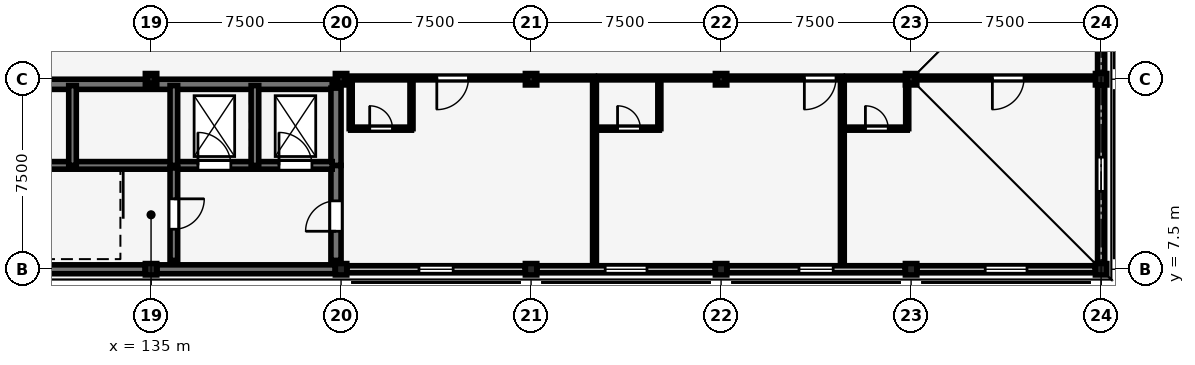
"""IFC4 building model, lengths in metres.
Left out: names, types, materials, properties, quantities, classifications, styles, units other than length and angle.
Written with IfcOpenShell. Run it as: python <this file> out.ifc"""

import sys

from ifc_helpers import new_model, si_unit, direction, frame, frame_2d, origin, origin_2d, place, context, subcontext, project, spatial, rectangle, i_section, extrude, element, fill, save


model = new_model("IFC4")
c1 = context("Model", 3, precision=1e-05, world=origin(), true_north=direction((0.0, 1.0)))
c2 = subcontext(c1, "Body", "Model", "MODEL_VIEW")
j1 = project(units=[si_unit("LENGTHUNIT", "METRE"), si_unit("PLANEANGLEUNIT", "RADIAN")], contexts=[c1])
p1 = place(None, origin())
s1 = spatial("IfcSite", under=j1, at=p1, CompositionType="ELEMENT")
p2 = place(p1, origin())
s2 = spatial("IfcBuilding", under=s1, at=p2, CompositionType="ELEMENT")
p3 = place(p2, frame((0.0, 0.0, 21.9)))
s3 = spatial("IfcBuildingStorey", under=s2, at=p3, CompositionType="ELEMENT", Elevation=21.9)
for number, where, z_axis, x_axis in (
    (1, (135.0, 7.5, 0.0), (0.0, 0.0, 1.0), (1.0, 0.0, 0.0)),
    (2, (135.0, 15.0, 0.0), (0.0, 0.0, 1.0), (1.0, 0.0, 0.0)),
    (3, (142.5, 7.5, 0.0), (0.0, 0.0, 1.0), (1.0, 0.0, 0.0)),
    (4, (142.5, 15.0, 0.0), (0.0, 0.0, 1.0), (1.0, 0.0, 0.0)),
    (5, (150.0, 7.5, 0.0), (0.0, 0.0, 1.0), (1.0, 0.0, 0.0)),
    (6, (150.0, 15.0, 0.0), (0.0, 0.0, 1.0), (1.0, 0.0, 0.0)),
    (7, (157.5, 7.5, 0.0), (0.0, 0.0, 1.0), (1.0, 0.0, 0.0)),
    (8, (157.5, 15.0, 0.0), (0.0, 0.0, 1.0), (1.0, 0.0, 0.0)),
    (9, (165.0, 7.5, 0.0), (0.0, 0.0, 1.0), (1.0, 0.0, 0.0)),
    (10, (165.0, 15.0, 0.0), (0.0, 0.0, 1.0), (1.0, 0.0, 0.0)),
    (11, (172.5, 7.5, 0.0), (0.0, 0.0, 1.0), (1.0, 0.0, 0.0)),
    (12, (172.5, 15.0, 0.0), (0.0, 0.0, 1.0), (1.0, 0.0, 0.0)),
):
    element("IfcColumn", number, at=place(p3, frame(where, z_axis=z_axis, x_axis=x_axis)), inside=s3, PredefinedType="COLUMN", context=c2, shape_type="SweptSolid", body=[
        extrude(rectangle(XDim=0.45, YDim=0.45, at=origin_2d()), origin(), (0.0, 0.0, 1.0), 4.05),
    ])
for number, where, z_axis, x_axis in (
    (13, (135.0, 15.0, 4.05), (0.0, 0.0, 1.0), (1.0, 0.0, 0.0)),
    (14, (142.5, 15.0, 4.05), (0.0, 0.0, 1.0), (1.0, 0.0, 0.0)),
    (15, (150.0, 15.0, 4.05), (0.0, 0.0, 1.0), (1.0, 0.0, 0.0)),
    (16, (157.5, 15.0, 4.05), (0.0, 0.0, 1.0), (1.0, 0.0, 0.0)),
    (17, (165.0, 15.0, 4.05), (0.0, 0.0, 1.0), (1.0, 0.0, 0.0)),
):
    element("IfcColumn", number, at=place(p3, frame(where, z_axis=z_axis, x_axis=x_axis)), inside=s3, PredefinedType="COLUMN", context=c2, shape_type="SweptSolid", body=[
        extrude(i_section(OverallWidth=0.3, OverallDepth=0.3, WebThickness=0.011, FlangeThickness=0.019, FilletRadius=0.027, at=origin_2d()), origin(), (0.0, 0.0, 1.0), 1.97),
    ])
for number, where, z_axis, x_axis in (
    (18, (134.765, 7.5, 0.0), (0.0, 0.0, 1.0), (-1.0, 0.0, 0.0)),
    (19, (142.265, 7.5, 0.0), (0.0, 0.0, 1.0), (-1.0, 0.0, 0.0)),
):
    element("IfcWall", number, at=place(p3, frame(where, z_axis=z_axis, x_axis=x_axis)), inside=s3, PredefinedType="SHEAR", context=c2, shape_type="SweptSolid", body=[
        extrude(rectangle(XDim=7.03, YDim=0.35, at=frame_2d((3.515, 0.0))), origin(), (0.0, 0.0, 1.0), 3.77),
    ])
p4 = place(p3, frame((149.765, 7.5, 0.0), z_axis=(0.0, 0.0, 1.0), x_axis=(-1.0, 0.0, 0.0)))
e20 = element("IfcWall", 20, at=p4, inside=s3, PredefinedType="STANDARD", context=c2, shape_type="SweptSolid", body=[
    extrude(rectangle(XDim=7.03, YDim=0.28, at=frame_2d((3.515, 0.0))), origin(), (0.0, 0.0, 1.0), 3.77),
])
p5 = place(p4, frame((2.84, 0.0, 0.85)))
e21 = element("IfcOpeningElement", 21, at=p5, cuts=e20, PredefinedType="OPENING", context=c2, shape_type="SweptSolid", body=[
    extrude(rectangle(XDim=1.35, YDim=2.25, at=frame_2d((0.675, 1.125))), frame((0.0, 0.15, 0.0), z_axis=(0.0, -1.0, 0.0), x_axis=(1.0, 0.0, 0.0)), (0.0, 0.0, 1.0), 0.3),
])
p6 = place(p3, frame((157.265, 7.5, 0.0), z_axis=(0.0, 0.0, 1.0), x_axis=(-1.0, 0.0, 0.0)))
e22 = element("IfcWall", 22, at=p6, inside=s3, PredefinedType="STANDARD", context=c2, shape_type="SweptSolid", body=[
    extrude(rectangle(XDim=7.03, YDim=0.28, at=frame_2d((3.515, 0.0))), origin(), (0.0, 0.0, 1.0), 3.77),
])
p7 = place(p6, frame((2.69, 0.0, 0.85)))
e23 = element("IfcOpeningElement", 23, at=p7, cuts=e22, PredefinedType="OPENING", context=c2, shape_type="SweptSolid", body=[
    extrude(rectangle(XDim=1.65, YDim=2.25, at=frame_2d((0.825, 1.125))), frame((0.0, 0.15, 0.0), z_axis=(0.0, -1.0, 0.0), x_axis=(1.0, 0.0, 0.0)), (0.0, 0.0, 1.0), 0.3),
])
p8 = place(p3, frame((164.765, 7.5, 0.0), z_axis=(0.0, 0.0, 1.0), x_axis=(-1.0, 0.0, 0.0)))
e24 = element("IfcWall", 24, at=p8, inside=s3, PredefinedType="STANDARD", context=c2, shape_type="SweptSolid", body=[
    extrude(rectangle(XDim=7.03, YDim=0.28, at=frame_2d((3.515, 0.0))), origin(), (0.0, 0.0, 1.0), 3.77),
])
p9 = place(p8, frame((2.84, 0.0, 0.85)))
e25 = element("IfcOpeningElement", 25, at=p9, cuts=e24, PredefinedType="OPENING", context=c2, shape_type="SweptSolid", body=[
    extrude(rectangle(XDim=1.35, YDim=2.25, at=frame_2d((0.675, 1.125))), frame((0.0, 0.15, 0.0), z_axis=(0.0, -1.0, 0.0), x_axis=(1.0, 0.0, 0.0)), (0.0, 0.0, 1.0), 0.3),
])
p10 = place(p3, frame((172.265, 7.5, 0.0), z_axis=(0.0, 0.0, 1.0), x_axis=(-1.0, 0.0, 0.0)))
e26 = element("IfcWall", 26, at=p10, inside=s3, PredefinedType="STANDARD", context=c2, shape_type="SweptSolid", body=[
    extrude(rectangle(XDim=7.03, YDim=0.28, at=frame_2d((3.515, 0.0))), origin(), (0.0, 0.0, 1.0), 3.77),
])
p11 = place(p10, frame((2.69, 0.0, 0.85)))
e27 = element("IfcOpeningElement", 27, at=p11, cuts=e26, PredefinedType="OPENING", context=c2, shape_type="SweptSolid", body=[
    extrude(rectangle(XDim=1.65, YDim=2.25, at=frame_2d((0.825, 1.125))), frame((0.0, 0.15, 0.0), z_axis=(0.0, -1.0, 0.0), x_axis=(1.0, 0.0, 0.0)), (0.0, 0.0, 1.0), 0.3),
])
p12 = place(p3, frame((172.5, 14.765, 0.0), z_axis=(0.0, 0.0, 1.0), x_axis=(0.0, -1.0, 0.0)))
e28 = element("IfcWall", 28, at=p12, inside=s3, PredefinedType="STANDARD", context=c2, shape_type="SweptSolid", body=[
    extrude(rectangle(XDim=7.03, YDim=0.28, at=frame_2d((3.515, 0.0))), origin(), (0.0, 0.0, 1.0), 3.77),
])
p13 = place(p12, frame((2.84, 0.0, 0.85)))
e29 = element("IfcOpeningElement", 29, at=p13, cuts=e28, PredefinedType="OPENING", context=c2, shape_type="SweptSolid", body=[
    extrude(rectangle(XDim=1.35, YDim=2.25, at=frame_2d((0.675, 1.125))), frame((0.0, 0.15, 0.0), z_axis=(0.0, -1.0, 0.0), x_axis=(1.0, 0.0, 0.0)), (0.0, 0.0, 1.0), 0.3),
])
p14 = place(p3, frame((172.5, 22.265, 0.0), z_axis=(0.0, 0.0, 1.0), x_axis=(0.0, -1.0, 0.0)))
e30 = element("IfcWall", 30, at=p14, inside=s3, PredefinedType="STANDARD", context=c2, shape_type="SweptSolid", body=[
    extrude(rectangle(XDim=7.03, YDim=0.28, at=frame_2d((3.515, 0.0))), origin(), (0.0, 0.0, 1.0), 3.77),
])
p15 = place(p14, frame((2.69, 0.0, 0.85)))
e31 = element("IfcOpeningElement", 31, at=p15, cuts=e30, PredefinedType="OPENING", context=c2, shape_type="SweptSolid", body=[
    extrude(rectangle(XDim=1.65, YDim=2.25, at=frame_2d((0.825, 1.125))), frame((0.0, 0.15, 0.0), z_axis=(0.0, -1.0, 0.0), x_axis=(1.0, 0.0, 0.0)), (0.0, 0.0, 1.0), 0.3),
])
p16 = place(p3, frame((127.85, 14.8, 0.0), z_axis=(0.0, 0.0, 1.0), x_axis=(1.0, 0.0, 0.0)))
e32 = element("IfcWall", 32, at=p16, inside=s3, PredefinedType="SHEAR", context=c2, shape_type="SweptSolid", body=[
    extrude(rectangle(XDim=14.3, YDim=0.4, at=frame_2d((7.15, 0.0))), origin(), (0.0, 0.0, 1.0), 3.77),
])
p17 = place(p3, frame((142.3, 7.85, 0.0), z_axis=(0.0, 0.0, 1.0), x_axis=(0.0, 1.0, 0.0)))
e33 = element("IfcWall", 33, at=p17, inside=s3, PredefinedType="SHEAR", context=c2, shape_type="SweptSolid", body=[
    extrude(rectangle(XDim=3.75, YDim=0.4, at=frame_2d((1.875, 0.0))), origin(), (0.0, 0.0, 1.0), 3.77),
])
p18 = place(p17, frame((1.15, 0.0, 0.0)))
e34 = element("IfcOpeningElement", 34, at=p18, cuts=e33, PredefinedType="OPENING", context=c2, shape_type="SweptSolid", body=[
    extrude(rectangle(XDim=1.2, YDim=2.25, at=frame_2d((0.6, 1.125))), frame((0.0, 0.21, 0.0), z_axis=(0.0, -1.0, 0.0), x_axis=(1.0, 0.0, 0.0)), (0.0, 0.0, 1.0), 0.42),
])
p19 = place(p3, frame((142.3, 11.6, 0.0), z_axis=(0.0, 0.0, 1.0), x_axis=(0.0, 1.0, 0.0)))
e35 = element("IfcWall", 35, at=p19, inside=s3, PredefinedType="SHEAR", context=c2, shape_type="SweptSolid", body=[
    extrude(rectangle(XDim=3.05, YDim=0.4, at=frame_2d((1.525, 0.0))), origin(), (0.0, 0.0, 1.0), 3.77),
])
p20 = place(p3, frame((127.85, 11.6, 0.0), z_axis=(0.0, 0.0, 1.0), x_axis=(1.0, 0.0, 0.0)))
e36 = element("IfcWall", 36, at=p20, inside=s3, PredefinedType="SHEAR", context=c2, shape_type="SweptSolid", body=[
    extrude(rectangle(XDim=8.05, YDim=0.3, at=frame_2d((4.025, 0.0))), origin(), (0.0, 0.0, 1.0), 3.77),
])
p21 = place(p3, frame((135.9, 11.6, 0.0), z_axis=(0.0, 0.0, 1.0), x_axis=(1.0, 0.0, 0.0)))
e37 = element("IfcWall", 37, at=p21, inside=s3, PredefinedType="SHEAR", context=c2, shape_type="SweptSolid", body=[
    extrude(rectangle(XDim=6.25, YDim=0.3, at=frame_2d((3.125, 0.0))), origin(), (0.0, 0.0, 1.0), 3.77),
])
p22 = place(p21, frame((0.95, 0.0, 0.0)))
e38 = element("IfcOpeningElement", 38, at=p22, cuts=e37, PredefinedType="OPENING", context=c2, shape_type="SweptSolid", body=[
    extrude(rectangle(XDim=1.3, YDim=2.2, at=frame_2d((0.65, 1.1))), frame((0.0, 0.16, 0.0), z_axis=(0.0, -1.0, 0.0), x_axis=(1.0, 0.0, 0.0)), (0.0, 0.0, 1.0), 0.32),
])
p23 = place(p21, frame((4.15, 0.0, 0.0)))
e39 = element("IfcOpeningElement", 39, at=p23, cuts=e37, PredefinedType="OPENING", context=c2, shape_type="SweptSolid", body=[
    extrude(rectangle(XDim=1.3, YDim=2.2, at=frame_2d((0.65, 1.1))), frame((0.0, 0.16, 0.0), z_axis=(0.0, -1.0, 0.0), x_axis=(1.0, 0.0, 0.0)), (0.0, 0.0, 1.0), 0.32),
])
p24 = place(p3, frame((135.9, 11.5, 0.0), z_axis=(0.0, 0.0, 1.0), x_axis=(0.0, -1.0, 0.0)))
e40 = element("IfcWall", 40, at=p24, inside=s3, PredefinedType="SHEAR", context=c2, shape_type="SweptSolid", body=[
    extrude(rectangle(XDim=3.65, YDim=0.3, at=frame_2d((1.825, 0.0))), origin(), (0.0, 0.0, 1.0), 3.77),
])
p25 = place(p24, frame((1.22, 0.0, 0.0)))
e41 = element("IfcOpeningElement", 41, at=p25, cuts=e40, PredefinedType="OPENING", context=c2, shape_type="SweptSolid", body=[
    extrude(rectangle(XDim=1.2, YDim=2.25, at=frame_2d((0.6, 1.125))), frame((0.0, 0.16, 0.0), z_axis=(0.0, -1.0, 0.0), x_axis=(1.0, 0.0, 0.0)), (0.0, 0.0, 1.0), 0.32),
])
for number, where, z_axis, x_axis in (
    (42, (131.9, 11.6, 0.0), (0.0, 0.0, 1.0), (0.0, 1.0, 0.0)),
    (43, (135.9, 11.6, 0.0), (0.0, 0.0, 1.0), (0.0, 1.0, 0.0)),
    (44, (139.1, 11.6, 0.0), (0.0, 0.0, 1.0), (0.0, 1.0, 0.0)),
):
    element("IfcWall", number, at=place(p3, frame(where, z_axis=z_axis, x_axis=x_axis)), inside=s3, PredefinedType="SHEAR", context=c2, shape_type="SweptSolid", body=[
        extrude(rectangle(XDim=3.15, YDim=0.3, at=frame_2d((1.575, 0.0))), origin(), (0.0, 0.0, 1.0), 3.77),
    ])
p26 = place(p3, frame((152.503, 15.05, 0.0), z_axis=(0.0, 0.0, 1.0), x_axis=(-1.0, 0.0, 0.0)))
e45 = element("IfcWall", 45, at=p26, inside=s3, PredefinedType="PARTITIONING", context=c2, shape_type="SweptSolid", body=[
    extrude(rectangle(XDim=9.624, YDim=0.15, at=frame_2d((4.812, 0.0))), origin(), (0.0, 0.0, 1.0), 3.755),
])
p27 = place(p26, frame((4.974, 0.0, 0.0)))
e46 = element("IfcOpeningElement", 46, at=p27, cuts=e45, PredefinedType="OPENING", context=c2, shape_type="SweptSolid", body=[
    extrude(rectangle(XDim=1.25, YDim=2.2, at=frame_2d((0.625, 1.1))), frame((0.0, 0.085, 0.0), z_axis=(0.0, -1.0, 0.0), x_axis=(1.0, 0.0, 0.0)), (0.0, 0.0, 1.0), 0.17),
])
p28 = place(p3, frame((142.88, 13.05, 0.0), z_axis=(0.0, 0.0, 1.0), x_axis=(1.0, 0.0, 0.0)))
e47 = element("IfcWall", 47, at=p28, inside=s3, PredefinedType="PARTITIONING", context=c2, shape_type="SweptSolid", body=[
    extrude(rectangle(XDim=2.4, YDim=0.12, at=frame_2d((1.2, 0.0))), origin(), (0.0, 0.0, 1.0), 3.755),
])
p29 = place(p28, frame((0.75, 0.0, 0.0)))
e48 = element("IfcOpeningElement", 48, at=p29, cuts=e47, PredefinedType="OPENING", context=c2, shape_type="SweptSolid", body=[
    extrude(rectangle(XDim=0.9, YDim=2.1, at=frame_2d((0.45, 1.05))), frame((0.0, 0.07, 0.0), z_axis=(0.0, -1.0, 0.0), x_axis=(1.0, 0.0, 0.0)), (0.0, 0.0, 1.0), 0.14),
])
p30 = place(p3, frame((145.28, 13.05, 0.0), z_axis=(0.0, 0.0, 1.0), x_axis=(0.0, 1.0, 0.0)))
e49 = element("IfcWall", 49, at=p30, inside=s3, PredefinedType="PARTITIONING", context=c2, shape_type="SweptSolid", body=[
    extrude(rectangle(XDim=2.0, YDim=0.12, at=frame_2d((1.0, 0.0))), origin(), (0.0, 0.0, 1.0), 3.755),
])
p31 = place(p3, frame((162.287, 15.05, 0.0), z_axis=(0.0, 0.0, 1.0), x_axis=(-1.0, 0.0, 0.0)))
e50 = element("IfcWall", 50, at=p31, inside=s3, PredefinedType="PARTITIONING", context=c2, shape_type="SweptSolid", body=[
    extrude(rectangle(XDim=9.623, YDim=0.15, at=frame_2d((4.812, 0.0))), origin(), (0.0, 0.0, 1.0), 3.755),
])
p32 = place(p31, frame((0.25, 0.0, 0.0)))
e51 = element("IfcOpeningElement", 51, at=p32, cuts=e50, PredefinedType="OPENING", context=c2, shape_type="SweptSolid", body=[
    extrude(rectangle(XDim=1.25, YDim=2.2, at=frame_2d((0.625, 1.1))), frame((0.0, 0.085, 0.0), z_axis=(0.0, -1.0, 0.0), x_axis=(1.0, 0.0, 0.0)), (0.0, 0.0, 1.0), 0.17),
])
p33 = place(p3, frame((152.663, 13.05, 0.0), z_axis=(0.0, 0.0, 1.0), x_axis=(1.0, 0.0, 0.0)))
e52 = element("IfcWall", 52, at=p33, inside=s3, PredefinedType="PARTITIONING", context=c2, shape_type="SweptSolid", body=[
    extrude(rectangle(XDim=2.4, YDim=0.12, at=frame_2d((1.2, 0.0))), origin(), (0.0, 0.0, 1.0), 3.755),
])
p34 = place(p33, frame((0.75, 0.0, 0.0)))
e53 = element("IfcOpeningElement", 53, at=p34, cuts=e52, PredefinedType="OPENING", context=c2, shape_type="SweptSolid", body=[
    extrude(rectangle(XDim=0.9, YDim=2.1, at=frame_2d((0.45, 1.05))), frame((0.0, 0.07, 0.0), z_axis=(0.0, -1.0, 0.0), x_axis=(1.0, 0.0, 0.0)), (0.0, 0.0, 1.0), 0.14),
])
p35 = place(p3, frame((155.063, 13.05, 0.0), z_axis=(0.0, 0.0, 1.0), x_axis=(0.0, 1.0, 0.0)))
e54 = element("IfcWall", 54, at=p35, inside=s3, PredefinedType="PARTITIONING", context=c2, shape_type="SweptSolid", body=[
    extrude(rectangle(XDim=2.0, YDim=0.12, at=frame_2d((1.0, 0.0))), origin(), (0.0, 0.0, 1.0), 3.755),
])
p36 = place(p3, frame((172.07, 15.05, 0.0), z_axis=(0.0, 0.0, 1.0), x_axis=(-1.0, 0.0, 0.0)))
e55 = element("IfcWall", 55, at=p36, inside=s3, PredefinedType="PARTITIONING", context=c2, shape_type="SweptSolid", body=[
    extrude(rectangle(XDim=9.623, YDim=0.15, at=frame_2d((4.812, 0.0))), origin(), (0.0, 0.0, 1.0), 3.755),
])
p37 = place(p36, frame((2.612, 0.0, 0.0)))
e56 = element("IfcOpeningElement", 56, at=p37, cuts=e55, PredefinedType="OPENING", context=c2, shape_type="SweptSolid", body=[
    extrude(rectangle(XDim=1.25, YDim=2.2, at=frame_2d((0.625, 1.1))), frame((0.0, 0.085, 0.0), z_axis=(0.0, -1.0, 0.0), x_axis=(1.0, 0.0, 0.0)), (0.0, 0.0, 1.0), 0.17),
])
p38 = place(p3, frame((162.447, 13.05, 0.0), z_axis=(0.0, 0.0, 1.0), x_axis=(1.0, 0.0, 0.0)))
e57 = element("IfcWall", 57, at=p38, inside=s3, PredefinedType="PARTITIONING", context=c2, shape_type="SweptSolid", body=[
    extrude(rectangle(XDim=2.4, YDim=0.12, at=frame_2d((1.2, 0.0))), origin(), (0.0, 0.0, 1.0), 3.755),
])
p39 = place(p38, frame((0.75, 0.0, 0.0)))
e58 = element("IfcOpeningElement", 58, at=p39, cuts=e57, PredefinedType="OPENING", context=c2, shape_type="SweptSolid", body=[
    extrude(rectangle(XDim=0.9, YDim=2.1, at=frame_2d((0.45, 1.05))), frame((0.0, 0.07, 0.0), z_axis=(0.0, -1.0, 0.0), x_axis=(1.0, 0.0, 0.0)), (0.0, 0.0, 1.0), 0.14),
])
p40 = place(p3, frame((164.847, 13.05, 0.0), z_axis=(0.0, 0.0, 1.0), x_axis=(0.0, 1.0, 0.0)))
e59 = element("IfcWall", 59, at=p40, inside=s3, PredefinedType="PARTITIONING", context=c2, shape_type="SweptSolid", body=[
    extrude(rectangle(XDim=2.0, YDim=0.12, at=frame_2d((1.0, 0.0))), origin(), (0.0, 0.0, 1.0), 3.755),
])
for number, where, z_axis, x_axis in (
    (60, (152.503, 7.85, 0.0), (0.0, 0.0, 1.0), (0.0, 1.0, 0.0)),
    (61, (162.287, 7.85, 0.0), (0.0, 0.0, 1.0), (0.0, 1.0, 0.0)),
):
    element("IfcWall", number, at=place(p3, frame(where, z_axis=z_axis, x_axis=x_axis)), inside=s3, PredefinedType="PARTITIONING", context=c2, shape_type="SweptSolid", body=[
        extrude(rectangle(XDim=7.2, YDim=0.15, at=frame_2d((3.6, 0.0))), origin(), (0.0, 0.0, 1.0), 3.755),
    ])
p41 = place(p3, frame((142.88, 13.05, 0.0), z_axis=(0.0, 0.0, 1.0), x_axis=(0.0, 1.0, 0.0)))
e62 = element("IfcWall", 62, at=p41, inside=s3, PredefinedType="PARTITIONING", context=c2, shape_type="SweptSolid", body=[
    extrude(rectangle(XDim=2.0, YDim=0.12, at=frame_2d((1.0, 0.0))), origin(), (0.0, 0.0, 1.0), 3.755),
])
p42 = place(p5, origin())
e63 = element("IfcWindow", 63, at=p42, inside=s3, PartitioningType="SINGLE_PANEL", PredefinedType="WINDOW", context=c2, shape_type="SweptSolid", body=[
    extrude(rectangle(XDim=1.35, YDim=2.25, at=frame_2d((0.675, 1.125))), frame((0.0, 0.03, 0.0), z_axis=(0.0, -1.0, 0.0), x_axis=(1.0, 0.0, 0.0)), (0.0, 0.0, 1.0), 0.06),
])
fill(e21, e63)
p43 = place(p7, origin())
e64 = element("IfcWindow", 64, at=p43, inside=s3, PartitioningType="SINGLE_PANEL", PredefinedType="WINDOW", context=c2, shape_type="SweptSolid", body=[
    extrude(rectangle(XDim=1.65, YDim=2.25, at=frame_2d((0.825, 1.125))), frame((0.0, 0.03, 0.0), z_axis=(0.0, -1.0, 0.0), x_axis=(1.0, 0.0, 0.0)), (0.0, 0.0, 1.0), 0.06),
])
fill(e23, e64)
p44 = place(p9, origin())
e65 = element("IfcWindow", 65, at=p44, inside=s3, PartitioningType="SINGLE_PANEL", PredefinedType="WINDOW", context=c2, shape_type="SweptSolid", body=[
    extrude(rectangle(XDim=1.35, YDim=2.25, at=frame_2d((0.675, 1.125))), frame((0.0, 0.03, 0.0), z_axis=(0.0, -1.0, 0.0), x_axis=(1.0, 0.0, 0.0)), (0.0, 0.0, 1.0), 0.06),
])
fill(e25, e65)
p45 = place(p11, origin())
e66 = element("IfcWindow", 66, at=p45, inside=s3, PartitioningType="SINGLE_PANEL", PredefinedType="WINDOW", context=c2, shape_type="SweptSolid", body=[
    extrude(rectangle(XDim=1.65, YDim=2.25, at=frame_2d((0.825, 1.125))), frame((0.0, 0.03, 0.0), z_axis=(0.0, -1.0, 0.0), x_axis=(1.0, 0.0, 0.0)), (0.0, 0.0, 1.0), 0.06),
])
fill(e27, e66)
p46 = place(p13, origin())
e67 = element("IfcWindow", 67, at=p46, inside=s3, PartitioningType="SINGLE_PANEL", PredefinedType="WINDOW", context=c2, shape_type="SweptSolid", body=[
    extrude(rectangle(XDim=1.35, YDim=2.25, at=frame_2d((0.675, 1.125))), frame((0.0, 0.03, 0.0), z_axis=(0.0, -1.0, 0.0), x_axis=(1.0, 0.0, 0.0)), (0.0, 0.0, 1.0), 0.06),
])
fill(e29, e67)
p47 = place(p18, origin())
e68 = element("IfcDoor", 68, at=p47, inside=s3, OperationType="SINGLE_SWING_LEFT", PredefinedType="DOOR", context=c2, shape_type="SweptSolid", body=[
    extrude(rectangle(XDim=1.2, YDim=2.25, at=frame_2d((0.6, 1.125))), frame((0.0, 0.025, 0.0), z_axis=(0.0, -1.0, 0.0), x_axis=(1.0, 0.0, 0.0)), (0.0, 0.0, 1.0), 0.05),
])
fill(e34, e68)
p48 = place(p22, origin())
e69 = element("IfcDoor", 69, at=p48, inside=s3, OperationType="DOUBLE_DOOR_SLIDING", PredefinedType="DOOR", context=c2, shape_type="SweptSolid", body=[
    extrude(rectangle(XDim=1.3, YDim=2.2, at=frame_2d((0.65, 1.1))), frame((0.0, 0.025, 0.0), z_axis=(0.0, -1.0, 0.0), x_axis=(1.0, 0.0, 0.0)), (0.0, 0.0, 1.0), 0.05),
])
fill(e38, e69)
p49 = place(p23, origin())
e70 = element("IfcDoor", 70, at=p49, inside=s3, OperationType="DOUBLE_DOOR_SLIDING", PredefinedType="DOOR", context=c2, shape_type="SweptSolid", body=[
    extrude(rectangle(XDim=1.3, YDim=2.2, at=frame_2d((0.65, 1.1))), frame((0.0, 0.025, 0.0), z_axis=(0.0, -1.0, 0.0), x_axis=(1.0, 0.0, 0.0)), (0.0, 0.0, 1.0), 0.05),
])
fill(e39, e70)
p50 = place(p25, origin())
e71 = element("IfcDoor", 71, at=p50, inside=s3, OperationType="SINGLE_SWING_LEFT", PredefinedType="DOOR", context=c2, shape_type="SweptSolid", body=[
    extrude(rectangle(XDim=1.2, YDim=2.25, at=frame_2d((0.6, 1.125))), frame((0.0, 0.025, 0.0), z_axis=(0.0, -1.0, 0.0), x_axis=(1.0, 0.0, 0.0)), (0.0, 0.0, 1.0), 0.05),
])
fill(e41, e71)
p51 = place(p27, origin())
e72 = element("IfcDoor", 72, at=p51, inside=s3, OperationType="SINGLE_SWING_RIGHT", PredefinedType="DOOR", context=c2, shape_type="SweptSolid", body=[
    extrude(rectangle(XDim=1.25, YDim=2.2, at=frame_2d((0.625, 1.1))), frame((0.0, 0.025, 0.0), z_axis=(0.0, -1.0, 0.0), x_axis=(1.0, 0.0, 0.0)), (0.0, 0.0, 1.0), 0.05),
])
fill(e46, e72)
p52 = place(p29, origin())
e73 = element("IfcDoor", 73, at=p52, inside=s3, OperationType="SINGLE_SWING_LEFT", PredefinedType="DOOR", context=c2, shape_type="SweptSolid", body=[
    extrude(rectangle(XDim=0.9, YDim=2.1, at=frame_2d((0.45, 1.05))), frame((0.0, 0.025, 0.0), z_axis=(0.0, -1.0, 0.0), x_axis=(1.0, 0.0, 0.0)), (0.0, 0.0, 1.0), 0.05),
])
fill(e48, e73)
p53 = place(p32, origin())
e74 = element("IfcDoor", 74, at=p53, inside=s3, OperationType="SINGLE_SWING_RIGHT", PredefinedType="DOOR", context=c2, shape_type="SweptSolid", body=[
    extrude(rectangle(XDim=1.25, YDim=2.2, at=frame_2d((0.625, 1.1))), frame((0.0, 0.025, 0.0), z_axis=(0.0, -1.0, 0.0), x_axis=(1.0, 0.0, 0.0)), (0.0, 0.0, 1.0), 0.05),
])
fill(e51, e74)
p54 = place(p34, origin())
e75 = element("IfcDoor", 75, at=p54, inside=s3, OperationType="SINGLE_SWING_LEFT", PredefinedType="DOOR", context=c2, shape_type="SweptSolid", body=[
    extrude(rectangle(XDim=0.9, YDim=2.1, at=frame_2d((0.45, 1.05))), frame((0.0, 0.025, 0.0), z_axis=(0.0, -1.0, 0.0), x_axis=(1.0, 0.0, 0.0)), (0.0, 0.0, 1.0), 0.05),
])
fill(e53, e75)
p55 = place(p37, origin())
e76 = element("IfcDoor", 76, at=p55, inside=s3, OperationType="SINGLE_SWING_RIGHT", PredefinedType="DOOR", context=c2, shape_type="SweptSolid", body=[
    extrude(rectangle(XDim=1.25, YDim=2.2, at=frame_2d((0.625, 1.1))), frame((0.0, 0.025, 0.0), z_axis=(0.0, -1.0, 0.0), x_axis=(1.0, 0.0, 0.0)), (0.0, 0.0, 1.0), 0.05),
])
fill(e56, e76)
p56 = place(p39, origin())
e77 = element("IfcDoor", 77, at=p56, inside=s3, OperationType="SINGLE_SWING_LEFT", PredefinedType="DOOR", context=c2, shape_type="SweptSolid", body=[
    extrude(rectangle(XDim=0.9, YDim=2.1, at=frame_2d((0.45, 1.05))), frame((0.0, 0.025, 0.0), z_axis=(0.0, -1.0, 0.0), x_axis=(1.0, 0.0, 0.0)), (0.0, 0.0, 1.0), 0.05),
])
fill(e58, e77)
save(model, sys.argv[1])
